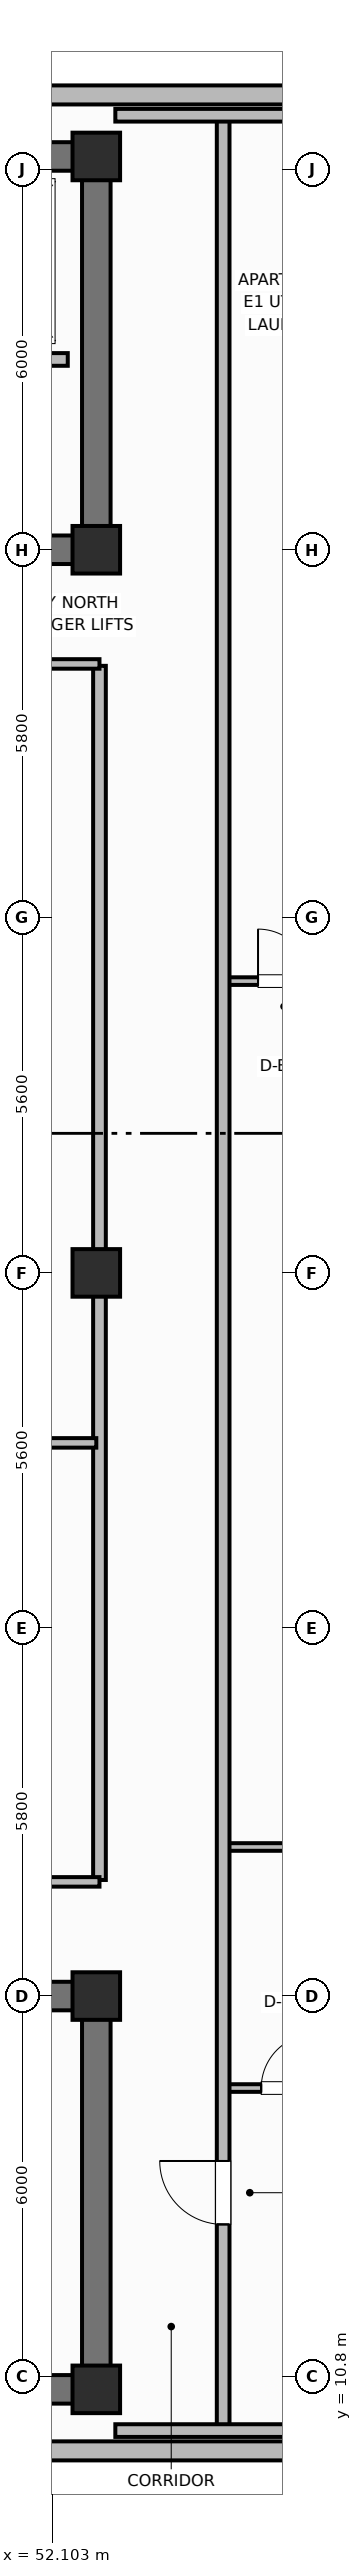
"""IFC4 building model, lengths in metres.
Left out: names, types, materials, properties, quantities, classifications, styles, units other than length and angle.
Written with IfcOpenShell. Run it as: python <this file> out.ifc"""

import sys

from ifc_helpers import new_model, si_unit, direction, frame, frame_2d, origin, origin_2d, place, context, subcontext, project, spatial, rectangle, extrude, element, fill, save


model = new_model("IFC4")
c1 = context("Model", 3, precision=1e-05, world=origin(), true_north=direction((0.0, 1.0)))
c2 = subcontext(c1, "Body", "Model", "MODEL_VIEW")
j1 = project(units=[si_unit("LENGTHUNIT", "METRE"), si_unit("PLANEANGLEUNIT", "RADIAN")], contexts=[c1])
p1 = place(None, origin())
s1 = spatial("IfcSite", under=j1, at=p1, CompositionType="ELEMENT")
p2 = place(p1, origin())
s2 = spatial("IfcBuilding", under=s1, at=p2, CompositionType="ELEMENT")
p3 = place(p2, frame((0.0, 0.0, 263.9)))
s3 = spatial("IfcBuildingStorey", under=s2, at=p3, CompositionType="ELEMENT", Elevation=263.9)
p4 = place(p3, frame((52.8, 10.6, 0.0), z_axis=(0.0, 0.0, 1.0), x_axis=(-1.0, 0.0, 0.0)))
e1 = element("IfcWall", 1, at=p4, inside=s3, PredefinedType="SHEAR", context=c2, shape_type="SweptSolid", body=[
    extrude(rectangle(XDim=27.2, YDim=0.45, at=frame_2d((13.6, 0.0))), origin(), (0.0, 0.0, 1.0), 3.7),
])
p5 = place(p3, frame((52.8, 10.825, 0.0), z_axis=(0.0, 0.0, 1.0), x_axis=(0.0, 1.0, 0.0)))
e2 = element("IfcWall", 2, at=p5, inside=s3, PredefinedType="SHEAR", context=c2, shape_type="SweptSolid", body=[
    extrude(rectangle(XDim=5.75, YDim=0.45, at=frame_2d((2.875, 0.0))), origin(), (0.0, 0.0, 1.0), 3.7),
])
p6 = place(p3, frame((25.6, 16.8, 0.0), z_axis=(0.0, 0.0, 1.0), x_axis=(1.0, 0.0, 0.0)))
e3 = element("IfcWall", 3, at=p6, inside=s3, PredefinedType="SHEAR", context=c2, shape_type="SweptSolid", body=[
    extrude(rectangle(XDim=27.2, YDim=0.45, at=frame_2d((13.6, 0.0))), origin(), (0.0, 0.0, 1.0), 3.7),
])
p7 = place(p6, frame((1.9, 0.0, 0.0)))
e4 = element("IfcOpeningElement", 4, at=p7, cuts=e3, PredefinedType="OPENING", context=c2, shape_type="SweptSolid", body=[
    extrude(rectangle(XDim=1.1, YDim=2.15, at=frame_2d((0.55, 1.075))), frame((0.0, 0.235, 0.0), z_axis=(0.0, -1.0, 0.0), x_axis=(1.0, 0.0, 0.0)), (0.0, 0.0, 1.0), 0.47),
])
p8 = place(p6, frame((13.0, 0.0, 0.0)))
e5 = element("IfcOpeningElement", 5, at=p8, cuts=e3, PredefinedType="OPENING", context=c2, shape_type="SweptSolid", body=[
    extrude(rectangle(XDim=1.2, YDim=2.15, at=frame_2d((0.6, 1.075))), frame((0.0, 0.235, 0.0), z_axis=(0.0, -1.0, 0.0), x_axis=(1.0, 0.0, 0.0)), (0.0, 0.0, 1.0), 0.47),
])
p9 = place(p6, frame((21.6, 0.0, 0.0)))
e6 = element("IfcOpeningElement", 6, at=p9, cuts=e3, PredefinedType="OPENING", context=c2, shape_type="SweptSolid", body=[
    extrude(rectangle(XDim=1.0, YDim=2.15, at=frame_2d((0.5, 1.075))), frame((0.0, 0.235, 0.0), z_axis=(0.0, -1.0, 0.0), x_axis=(1.0, 0.0, 0.0)), (0.0, 0.0, 1.0), 0.47),
])
p10 = place(p3, frame((25.6, 45.8, 0.0), z_axis=(0.0, 0.0, 1.0), x_axis=(1.0, 0.0, 0.0)))
e7 = element("IfcWall", 7, at=p10, inside=s3, PredefinedType="SHEAR", context=c2, shape_type="SweptSolid", body=[
    extrude(rectangle(XDim=27.2, YDim=0.45, at=frame_2d((13.6, 0.0))), origin(), (0.0, 0.0, 1.0), 3.7),
])
p11 = place(p3, frame((52.8, 39.825, 0.0), z_axis=(0.0, 0.0, 1.0), x_axis=(0.0, 1.0, 0.0)))
e8 = element("IfcWall", 8, at=p11, inside=s3, PredefinedType="SHEAR", context=c2, shape_type="SweptSolid", body=[
    extrude(rectangle(XDim=5.75, YDim=0.45, at=frame_2d((2.875, 0.0))), origin(), (0.0, 0.0, 1.0), 3.7),
])
p12 = place(p3, frame((52.8, 39.6, 0.0), z_axis=(0.0, 0.0, 1.0), x_axis=(-1.0, 0.0, 0.0)))
e9 = element("IfcWall", 9, at=p12, inside=s3, PredefinedType="SHEAR", context=c2, shape_type="SweptSolid", body=[
    extrude(rectangle(XDim=27.2, YDim=0.45, at=frame_2d((13.6, 0.0))), origin(), (0.0, 0.0, 1.0), 3.7),
])
p13 = place(p12, frame((24.2, 0.0, 0.0)))
e10 = element("IfcOpeningElement", 10, at=p13, cuts=e9, PredefinedType="OPENING", context=c2, shape_type="SweptSolid", body=[
    extrude(rectangle(XDim=1.1, YDim=2.15, at=frame_2d((0.55, 1.075))), frame((0.0, 0.235, 0.0), z_axis=(0.0, -1.0, 0.0), x_axis=(1.0, 0.0, 0.0)), (0.0, 0.0, 1.0), 0.47),
])
p14 = place(p12, frame((15.1, 0.0, 0.0)))
e11 = element("IfcOpeningElement", 11, at=p14, cuts=e9, PredefinedType="OPENING", context=c2, shape_type="SweptSolid", body=[
    extrude(rectangle(XDim=1.2, YDim=2.15, at=frame_2d((0.6, 1.075))), frame((0.0, 0.235, 0.0), z_axis=(0.0, -1.0, 0.0), x_axis=(1.0, 0.0, 0.0)), (0.0, 0.0, 1.0), 0.47),
])
p15 = place(p12, frame((11.6, 0.0, 0.0)))
e12 = element("IfcOpeningElement", 12, at=p15, cuts=e9, PredefinedType="OPENING", context=c2, shape_type="SweptSolid", body=[
    extrude(rectangle(XDim=0.9, YDim=2.1, at=frame_2d((0.45, 1.05))), frame((0.0, 0.235, 0.0), z_axis=(0.0, -1.0, 0.0), x_axis=(1.0, 0.0, 0.0)), (0.0, 0.0, 1.0), 0.47),
])
p16 = place(p12, frame((7.35, 0.0, 0.0)))
e13 = element("IfcOpeningElement", 13, at=p16, cuts=e9, PredefinedType="OPENING", context=c2, shape_type="SweptSolid", body=[
    extrude(rectangle(XDim=0.85, YDim=2.1, at=frame_2d((0.425, 1.05))), frame((0.0, 0.235, 0.0), z_axis=(0.0, -1.0, 0.0), x_axis=(1.0, 0.0, 0.0)), (0.0, 0.0, 1.0), 0.47),
])
p17 = place(p12, frame((4.2, 0.0, 0.0)))
e14 = element("IfcOpeningElement", 14, at=p17, cuts=e9, PredefinedType="OPENING", context=c2, shape_type="SweptSolid", body=[
    extrude(rectangle(XDim=1.3, YDim=2.2, at=frame_2d((0.65, 1.1))), frame((0.0, 0.235, 0.0), z_axis=(0.0, -1.0, 0.0), x_axis=(1.0, 0.0, 0.0)), (0.0, 0.0, 1.0), 0.47),
])
for number, where, z_axis, x_axis in (
    (15, (52.8, 10.6, 0.0), (0.0, 0.0, 1.0), (1.0, 0.0, 0.0)),
    (16, (52.8, 16.8, 0.0), (0.0, 0.0, 1.0), (1.0, 0.0, 0.0)),
    (17, (52.8, 39.6, 0.0), (0.0, 0.0, 1.0), (1.0, 0.0, 0.0)),
    (18, (52.8, 45.8, 0.0), (0.0, 0.0, 1.0), (1.0, 0.0, 0.0)),
    (19, (52.8, 28.2, 0.0), (0.0, 0.0, 1.0), (1.0, 0.0, 0.0)),
):
    element("IfcColumn", number, at=place(p3, frame(where, z_axis=z_axis, x_axis=x_axis)), inside=s3, PredefinedType="COLUMN", context=c2, shape_type="SweptSolid", body=[
        extrude(rectangle(XDim=0.75, YDim=0.75, at=origin_2d()), origin(), (0.0, 0.0, 1.0), 3.7),
    ])
p18 = place(p3, frame((22.56, 9.63, 0.0), z_axis=(0.0, 0.0, 1.0), x_axis=(1.0, 0.0, 0.0)))
e20 = element("IfcWall", 20, at=p18, inside=s3, PredefinedType="SOLIDWALL", context=c2, shape_type="SweptSolid", body=[
    extrude(rectangle(XDim=33.28, YDim=0.3, at=frame_2d((16.64, 0.0))), origin(), (0.0, 0.0, 1.0), 2.73),
])
p19 = place(p18, frame((5.18, 0.0, 0.71)))
e21 = element("IfcOpeningElement", 21, at=p19, cuts=e20, PredefinedType="OPENING", context=c2, shape_type="SweptSolid", body=[
    extrude(rectangle(XDim=1.6, YDim=1.9, at=frame_2d((0.8, 0.95))), frame((0.0, 0.16, 0.0), z_axis=(0.0, -1.0, 0.0), x_axis=(1.0, 0.0, 0.0)), (0.0, 0.0, 1.0), 0.32),
])
p20 = place(p18, frame((8.733, 0.0, 0.71)))
e22 = element("IfcOpeningElement", 22, at=p20, cuts=e20, PredefinedType="OPENING", context=c2, shape_type="SweptSolid", body=[
    extrude(rectangle(XDim=1.6, YDim=1.9, at=frame_2d((0.8, 0.95))), frame((0.0, 0.16, 0.0), z_axis=(0.0, -1.0, 0.0), x_axis=(1.0, 0.0, 0.0)), (0.0, 0.0, 1.0), 0.32),
])
p21 = place(p18, frame((15.84, 0.0, 0.71)))
e23 = element("IfcOpeningElement", 23, at=p21, cuts=e20, PredefinedType="OPENING", context=c2, shape_type="SweptSolid", body=[
    extrude(rectangle(XDim=1.6, YDim=1.9, at=frame_2d((0.8, 0.95))), frame((0.0, 0.16, 0.0), z_axis=(0.0, -1.0, 0.0), x_axis=(1.0, 0.0, 0.0)), (0.0, 0.0, 1.0), 0.32),
])
p22 = place(p18, frame((22.947, 0.0, 0.71)))
e24 = element("IfcOpeningElement", 24, at=p22, cuts=e20, PredefinedType="OPENING", context=c2, shape_type="SweptSolid", body=[
    extrude(rectangle(XDim=1.6, YDim=1.9, at=frame_2d((0.8, 0.95))), frame((0.0, 0.16, 0.0), z_axis=(0.0, -1.0, 0.0), x_axis=(1.0, 0.0, 0.0)), (0.0, 0.0, 1.0), 0.32),
])
p23 = place(p18, frame((26.5, 0.0, 0.71)))
e25 = element("IfcOpeningElement", 25, at=p23, cuts=e20, PredefinedType="OPENING", context=c2, shape_type="SweptSolid", body=[
    extrude(rectangle(XDim=1.6, YDim=1.9, at=frame_2d((0.8, 0.95))), frame((0.0, 0.16, 0.0), z_axis=(0.0, -1.0, 0.0), x_axis=(1.0, 0.0, 0.0)), (0.0, 0.0, 1.0), 0.32),
])
p24 = place(p3, frame((55.84, 46.77, 0.0), z_axis=(0.0, 0.0, 1.0), x_axis=(-1.0, 0.0, 0.0)))
e26 = element("IfcWall", 26, at=p24, inside=s3, PredefinedType="SOLIDWALL", context=c2, shape_type="SweptSolid", body=[
    extrude(rectangle(XDim=33.28, YDim=0.3, at=frame_2d((16.64, 0.0))), origin(), (0.0, 0.0, 1.0), 2.73),
])
p25 = place(p24, frame((5.596, 0.0, 0.71)))
e27 = element("IfcOpeningElement", 27, at=p25, cuts=e26, PredefinedType="OPENING", context=c2, shape_type="SweptSolid", body=[
    extrude(rectangle(XDim=2.1, YDim=1.9, at=frame_2d((1.05, 0.95))), frame((0.0, 0.16, 0.0), z_axis=(0.0, -1.0, 0.0), x_axis=(1.0, 0.0, 0.0)), (0.0, 0.0, 1.0), 0.32),
])
p26 = place(p24, frame((9.244, 0.0, 0.71)))
e28 = element("IfcOpeningElement", 28, at=p26, cuts=e26, PredefinedType="OPENING", context=c2, shape_type="SweptSolid", body=[
    extrude(rectangle(XDim=2.1, YDim=1.9, at=frame_2d((1.05, 0.95))), frame((0.0, 0.16, 0.0), z_axis=(0.0, -1.0, 0.0), x_axis=(1.0, 0.0, 0.0)), (0.0, 0.0, 1.0), 0.32),
])
p27 = place(p24, frame((13.941, 0.0, 0.71)))
e29 = element("IfcOpeningElement", 29, at=p27, cuts=e26, PredefinedType="OPENING", context=c2, shape_type="SweptSolid", body=[
    extrude(rectangle(XDim=2.1, YDim=1.9, at=frame_2d((1.05, 0.95))), frame((0.0, 0.16, 0.0), z_axis=(0.0, -1.0, 0.0), x_axis=(1.0, 0.0, 0.0)), (0.0, 0.0, 1.0), 0.32),
])
p28 = place(p24, frame((17.239, 0.0, 0.71)))
e30 = element("IfcOpeningElement", 30, at=p28, cuts=e26, PredefinedType="OPENING", context=c2, shape_type="SweptSolid", body=[
    extrude(rectangle(XDim=2.1, YDim=1.9, at=frame_2d((1.05, 0.95))), frame((0.0, 0.16, 0.0), z_axis=(0.0, -1.0, 0.0), x_axis=(1.0, 0.0, 0.0)), (0.0, 0.0, 1.0), 0.32),
])
p29 = place(p24, frame((21.936, 0.0, 0.71)))
e31 = element("IfcOpeningElement", 31, at=p29, cuts=e26, PredefinedType="OPENING", context=c2, shape_type="SweptSolid", body=[
    extrude(rectangle(XDim=2.1, YDim=1.9, at=frame_2d((1.05, 0.95))), frame((0.0, 0.16, 0.0), z_axis=(0.0, -1.0, 0.0), x_axis=(1.0, 0.0, 0.0)), (0.0, 0.0, 1.0), 0.32),
])
p30 = place(p24, frame((25.584, 0.0, 0.71)))
e32 = element("IfcOpeningElement", 32, at=p30, cuts=e26, PredefinedType="OPENING", context=c2, shape_type="SweptSolid", body=[
    extrude(rectangle(XDim=2.1, YDim=1.9, at=frame_2d((1.05, 0.95))), frame((0.0, 0.16, 0.0), z_axis=(0.0, -1.0, 0.0), x_axis=(1.0, 0.0, 0.0)), (0.0, 0.0, 1.0), 0.32),
])
p31 = place(p3, frame((52.35, 42.6, 0.0), z_axis=(0.0, 0.0, 1.0), x_axis=(-1.0, 0.0, 0.0)))
e33 = element("IfcWall", 33, at=p31, inside=s3, PredefinedType="PARTITIONING", context=c2, shape_type="SweptSolid", body=[
    extrude(rectangle(XDim=6.5, YDim=0.2, at=frame_2d((3.25, 0.0))), origin(), (0.0, 0.0, 1.0), 2.56),
])
p32 = place(p31, frame((4.9, 0.0, 0.0)))
e34 = element("IfcOpeningElement", 34, at=p32, cuts=e33, PredefinedType="OPENING", context=c2, shape_type="SweptSolid", body=[
    extrude(rectangle(XDim=1.0, YDim=2.15, at=frame_2d((0.5, 1.075))), frame((0.0, 0.11, 0.0), z_axis=(0.0, -1.0, 0.0), x_axis=(1.0, 0.0, 0.0)), (0.0, 0.0, 1.0), 0.22),
])
p33 = place(p31, frame((2.8, 0.0, 0.0)))
e35 = element("IfcOpeningElement", 35, at=p33, cuts=e33, PredefinedType="OPENING", context=c2, shape_type="SweptSolid", body=[
    extrude(rectangle(XDim=1.0, YDim=2.15, at=frame_2d((0.5, 1.075))), frame((0.0, 0.11, 0.0), z_axis=(0.0, -1.0, 0.0), x_axis=(1.0, 0.0, 0.0)), (0.0, 0.0, 1.0), 0.22),
])
p34 = place(p31, frame((0.7, 0.0, 0.0)))
e36 = element("IfcOpeningElement", 36, at=p34, cuts=e33, PredefinedType="OPENING", context=c2, shape_type="SweptSolid", body=[
    extrude(rectangle(XDim=1.0, YDim=2.15, at=frame_2d((0.5, 1.075))), frame((0.0, 0.11, 0.0), z_axis=(0.0, -1.0, 0.0), x_axis=(1.0, 0.0, 0.0)), (0.0, 0.0, 1.0), 0.22),
])
p35 = place(p3, frame((52.85, 18.63, 0.0), z_axis=(0.0, 0.0, 1.0), x_axis=(0.0, 1.0, 0.0)))
e37 = element("IfcWall", 37, at=p35, inside=s3, PredefinedType="PARTITIONING", context=c2, shape_type="SweptSolid", body=[
    extrude(rectangle(XDim=19.14, YDim=0.2, at=frame_2d((9.57, 0.0))), origin(), (0.0, 0.0, 1.0), 2.56),
])
for number, where, z_axis, x_axis in (
    (38, (29.9, 18.6, 0.0), (0.0, 0.0, 1.0), (1.0, 0.0, 0.0)),
    (39, (29.9, 37.8, 0.0), (0.0, 0.0, 1.0), (1.0, 0.0, 0.0)),
):
    element("IfcWall", number, at=place(p3, frame(where, z_axis=z_axis, x_axis=x_axis)), inside=s3, PredefinedType="PARTITIONING", context=c2, shape_type="SweptSolid", body=[
        extrude(rectangle(XDim=22.95, YDim=0.15, at=frame_2d((11.475, 0.0))), origin(), (0.0, 0.0, 1.0), 2.56),
    ])
p36 = place(p3, frame((29.93, 25.521, 0.0), z_axis=(0.0, 0.0, 1.0), x_axis=(1.0, 0.0, 0.0)))
e40 = element("IfcWall", 40, at=p36, inside=s3, PredefinedType="PARTITIONING", context=c2, shape_type="SweptSolid", body=[
    extrude(rectangle(XDim=22.87, YDim=0.15, at=frame_2d((11.435, 0.0))), origin(), (0.0, 0.0, 1.0), 2.56),
])
p37 = place(p3, frame((54.8, 15.35, 0.0), z_axis=(0.0, 0.0, 1.0), x_axis=(1.0, 0.0, 0.0)))
e41 = element("IfcWall", 41, at=p37, inside=s3, PredefinedType="PARTITIONING", context=c2, shape_type="SweptSolid", body=[
    extrude(rectangle(XDim=1.95, YDim=0.12, at=frame_2d((0.975, 0.0))), origin(), (0.0, 0.0, 1.0), 2.56),
])
p38 = place(p37, frame((0.6, 0.0, 0.0)))
e42 = element("IfcOpeningElement", 42, at=p38, cuts=e41, PredefinedType="OPENING", context=c2, shape_type="SweptSolid", body=[
    extrude(rectangle(XDim=0.85, YDim=2.1, at=frame_2d((0.425, 1.05))), frame((0.0, 0.07, 0.0), z_axis=(0.0, -1.0, 0.0), x_axis=(1.0, 0.0, 0.0)), (0.0, 0.0, 1.0), 0.14),
])
p39 = place(p3, frame((54.8, 19.15, 0.0), z_axis=(0.0, 0.0, 1.0), x_axis=(1.0, 0.0, 0.0)))
e43 = element("IfcWall", 43, at=p39, inside=s3, PredefinedType="PARTITIONING", context=c2, shape_type="SweptSolid", body=[
    extrude(rectangle(XDim=1.95, YDim=0.12, at=frame_2d((0.975, 0.0))), origin(), (0.0, 0.0, 1.0), 2.56),
])
p40 = place(p3, frame((54.8, 32.8, 0.0), z_axis=(0.0, 0.0, 1.0), x_axis=(1.0, 0.0, 0.0)))
e44 = element("IfcWall", 44, at=p40, inside=s3, PredefinedType="PARTITIONING", context=c2, shape_type="SweptSolid", body=[
    extrude(rectangle(XDim=1.95, YDim=0.12, at=frame_2d((0.975, 0.0))), origin(), (0.0, 0.0, 1.0), 2.56),
])
p41 = place(p40, frame((0.55, 0.0, 0.0)))
e45 = element("IfcOpeningElement", 45, at=p41, cuts=e44, PredefinedType="OPENING", context=c2, shape_type="SweptSolid", body=[
    extrude(rectangle(XDim=0.82, YDim=2.08, at=frame_2d((0.41, 1.04))), frame((0.0, 0.07, 0.0), z_axis=(0.0, -1.0, 0.0), x_axis=(1.0, 0.0, 0.0)), (0.0, 0.0, 1.0), 0.14),
])
p42 = place(p3, frame((54.8, 9.95, 0.0), z_axis=(0.0, 0.0, 1.0), x_axis=(0.0, 1.0, 0.0)))
e46 = element("IfcWall", 46, at=p42, inside=s3, PredefinedType="PARTITIONING", context=c2, shape_type="SweptSolid", body=[
    extrude(rectangle(XDim=36.5, YDim=0.2, at=frame_2d((18.25, 0.0))), origin(), (0.0, 0.0, 1.0), 2.56),
])
p43 = place(p42, frame((3.25, 0.0, 0.0)))
e47 = element("IfcOpeningElement", 47, at=p43, cuts=e46, PredefinedType="OPENING", context=c2, shape_type="SweptSolid", body=[
    extrude(rectangle(XDim=1.0, YDim=2.15, at=frame_2d((0.5, 1.075))), frame((0.0, 0.11, 0.0), z_axis=(0.0, -1.0, 0.0), x_axis=(1.0, 0.0, 0.0)), (0.0, 0.0, 1.0), 0.22),
])
for number, where, z_axis, x_axis in (
    (48, (53.1, 9.95, 0.0), (0.0, 0.0, 1.0), (1.0, 0.0, 0.0)),
    (49, (53.1, 46.45, 0.0), (0.0, 0.0, 1.0), (1.0, 0.0, 0.0)),
):
    element("IfcWall", number, at=place(p3, frame(where, z_axis=z_axis, x_axis=x_axis)), inside=s3, PredefinedType="PARTITIONING", context=c2, shape_type="SweptSolid", body=[
        extrude(rectangle(XDim=3.754, YDim=0.2, at=frame_2d((1.877, 0.0))), origin(), (0.0, 0.0, 1.0), 2.56),
    ])
p44 = place(p38, origin())
e50 = element("IfcDoor", 50, at=p44, inside=s3, OperationType="SINGLE_SWING_RIGHT", PredefinedType="DOOR", context=c2, shape_type="SweptSolid", body=[
    extrude(rectangle(XDim=0.85, YDim=2.1, at=frame_2d((0.425, 1.05))), frame((0.0, 0.025, 0.0), z_axis=(0.0, -1.0, 0.0), x_axis=(1.0, 0.0, 0.0)), (0.0, 0.0, 1.0), 0.05),
])
fill(e42, e50)
p45 = place(p41, origin())
e51 = element("IfcDoor", 51, at=p45, inside=s3, OperationType="SINGLE_SWING_LEFT", PredefinedType="DOOR", context=c2, shape_type="SweptSolid", body=[
    extrude(rectangle(XDim=0.82, YDim=2.08, at=frame_2d((0.41, 1.04))), frame((0.0, 0.025, 0.0), z_axis=(0.0, -1.0, 0.0), x_axis=(1.0, 0.0, 0.0)), (0.0, 0.0, 1.0), 0.05),
])
fill(e45, e51)
p46 = place(p43, origin())
e52 = element("IfcDoor", 52, at=p46, inside=s3, OperationType="SINGLE_SWING_RIGHT", PredefinedType="DOOR", context=c2, shape_type="SweptSolid", body=[
    extrude(rectangle(XDim=1.0, YDim=2.15, at=frame_2d((0.5, 1.075))), frame((0.0, 0.025, 0.0), z_axis=(0.0, -1.0, 0.0), x_axis=(1.0, 0.0, 0.0)), (0.0, 0.0, 1.0), 0.05),
])
fill(e47, e52)
save(model, sys.argv[1])
